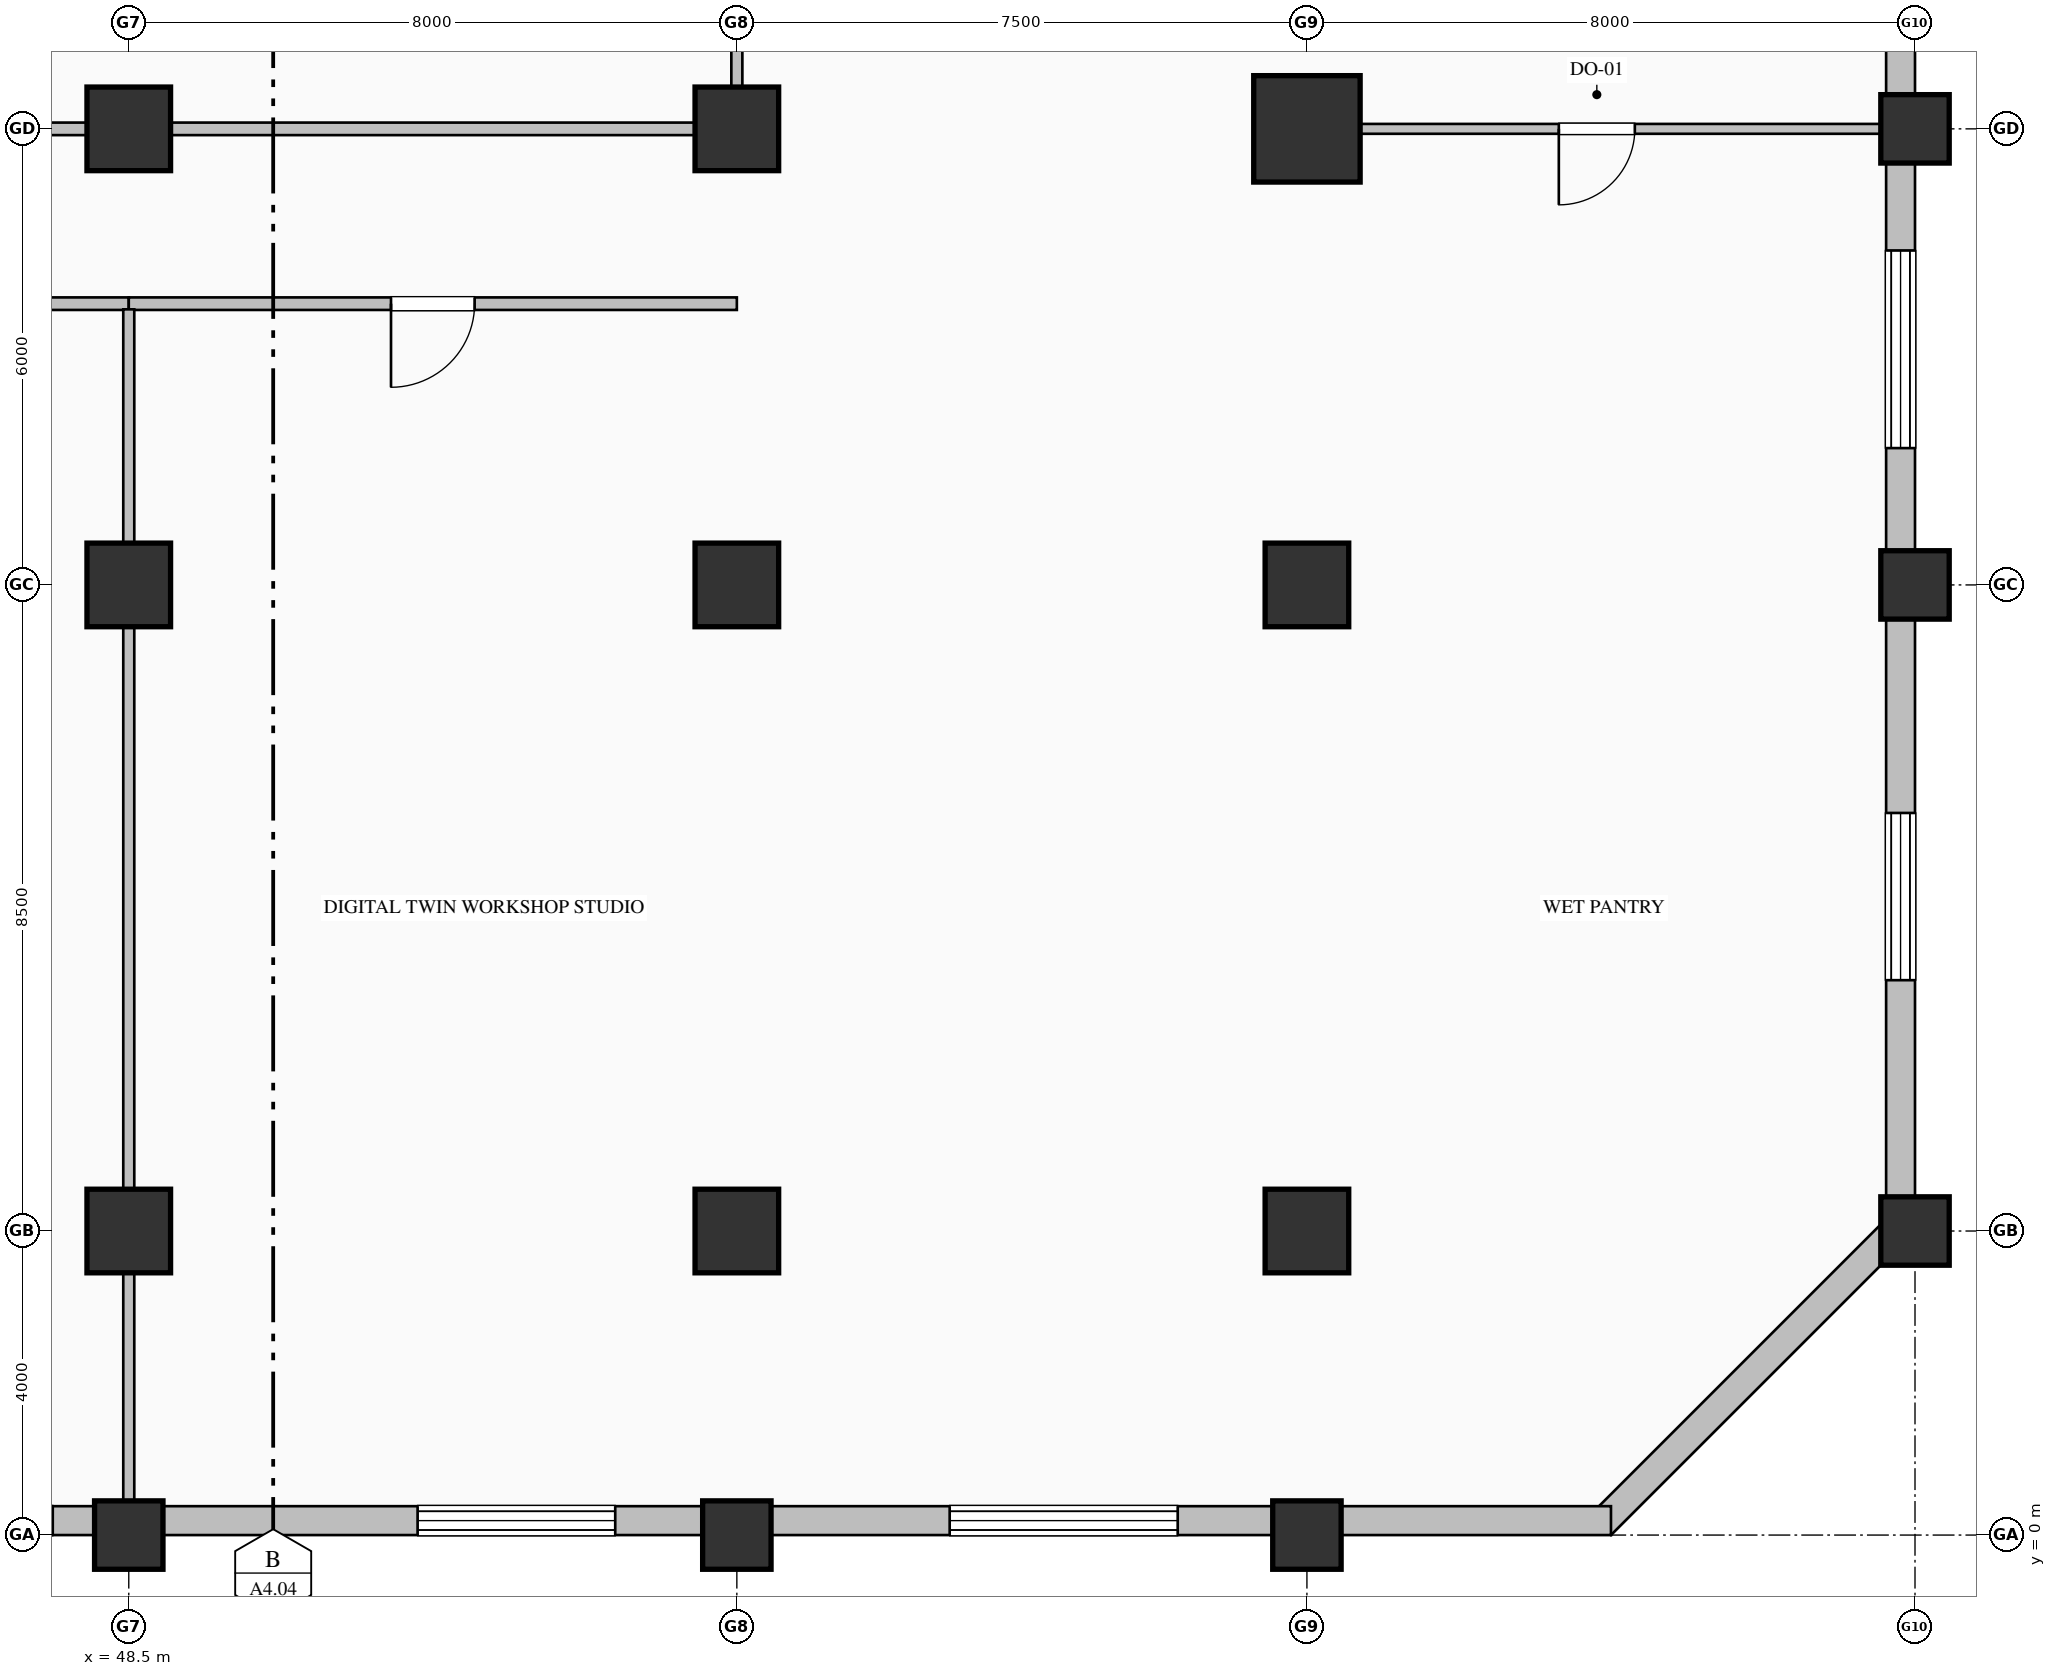
"""IFC4 building model, lengths in metres.
Left out: names, types, materials, properties, quantities, classifications, styles, units other than length and angle.
Written with IfcOpenShell. Run it as: python <this file> out.ifc"""

import sys

from ifc_helpers import new_model, si_unit, direction, frame, frame_2d, origin, origin_2d, place, context, subcontext, project, spatial, rectangle, hollow_rectangle, extrude, element, fill, save


model = new_model("IFC4")
c1 = context("Model", 3, precision=1e-05, world=origin(), true_north=direction((0.0, 1.0)))
c2 = subcontext(c1, "Body", "Model", "MODEL_VIEW")
j1 = project(units=[si_unit("LENGTHUNIT", "METRE"), si_unit("PLANEANGLEUNIT", "RADIAN")], contexts=[c1])
p1 = place(None, origin())
s1 = spatial("IfcSite", under=j1, at=p1, CompositionType="ELEMENT")
p2 = place(p1, origin())
s2 = spatial("IfcBuilding", under=s1, at=p2, CompositionType="ELEMENT")
p3 = place(p2, frame((0.0, 0.0, 17.4)))
s3 = spatial("IfcBuildingStorey", under=s2, at=p3, CompositionType="ELEMENT", Elevation=17.4)
p4 = place(p3, frame((48.5, 0.0, 0.0), z_axis=(0.0, 0.0, 1.0), x_axis=(1.0, 0.0, 0.0)))
e1 = element("IfcColumn", 1, at=p4, inside=s3, PredefinedType="PILASTER", context=c2, shape_type="SweptSolid", body=[
    extrude(rectangle(XDim=0.9, YDim=0.9, at=origin_2d()), origin(), (0.0, 0.0, 1.0), 5.4),
])
for number, where, z_axis, x_axis in (
    (2, (48.5, 4.0, 0.0), (0.0, 0.0, 1.0), (1.0, 0.0, 0.0)),
    (3, (48.5, 12.5, 0.0), (0.0, 0.0, 1.0), (1.0, 0.0, 0.0)),
    (4, (48.5, 18.5, 0.0), (0.0, 0.0, 1.0), (1.0, 0.0, 0.0)),
):
    element("IfcColumn", number, at=place(p3, frame(where, z_axis=z_axis, x_axis=x_axis)), inside=s3, PredefinedType="COLUMN", context=c2, shape_type="SweptSolid", body=[
        extrude(rectangle(XDim=1.1, YDim=1.1, at=origin_2d()), origin(), (0.0, 0.0, 1.0), 5.4),
    ])
p5 = place(p3, frame((56.5, 0.0, 0.0), z_axis=(0.0, 0.0, 1.0), x_axis=(1.0, 0.0, 0.0)))
e5 = element("IfcColumn", 5, at=p5, inside=s3, PredefinedType="PILASTER", context=c2, shape_type="SweptSolid", body=[
    extrude(rectangle(XDim=0.9, YDim=0.9, at=origin_2d()), origin(), (0.0, 0.0, 1.0), 5.4),
])
for number, where, z_axis, x_axis in (
    (6, (56.5, 4.0, 0.0), (0.0, 0.0, 1.0), (1.0, 0.0, 0.0)),
    (7, (56.5, 12.5, 0.0), (0.0, 0.0, 1.0), (1.0, 0.0, 0.0)),
    (8, (56.5, 18.5, 0.0), (0.0, 0.0, 1.0), (1.0, 0.0, 0.0)),
):
    element("IfcColumn", number, at=place(p3, frame(where, z_axis=z_axis, x_axis=x_axis)), inside=s3, PredefinedType="COLUMN", context=c2, shape_type="SweptSolid", body=[
        extrude(rectangle(XDim=1.1, YDim=1.1, at=origin_2d()), origin(), (0.0, 0.0, 1.0), 5.4),
    ])
p6 = place(p3, frame((64.0, 0.0, 0.0), z_axis=(0.0, 0.0, 1.0), x_axis=(1.0, 0.0, 0.0)))
e9 = element("IfcColumn", 9, at=p6, inside=s3, PredefinedType="PILASTER", context=c2, shape_type="SweptSolid", body=[
    extrude(rectangle(XDim=0.9, YDim=0.9, at=origin_2d()), origin(), (0.0, 0.0, 1.0), 5.4),
])
for number, where, z_axis, x_axis in (
    (10, (64.0, 4.0, 0.0), (0.0, 0.0, 1.0), (1.0, 0.0, 0.0)),
    (11, (64.0, 12.5, 0.0), (0.0, 0.0, 1.0), (1.0, 0.0, 0.0)),
):
    element("IfcColumn", number, at=place(p3, frame(where, z_axis=z_axis, x_axis=x_axis)), inside=s3, PredefinedType="COLUMN", context=c2, shape_type="SweptSolid", body=[
        extrude(rectangle(XDim=1.1, YDim=1.1, at=origin_2d()), origin(), (0.0, 0.0, 1.0), 5.4),
    ])
p7 = place(p3, frame((64.0, 18.5, 0.0), z_axis=(0.0, 0.0, 1.0), x_axis=(1.0, 0.0, 0.0)))
e12 = element("IfcColumn", 12, at=p7, inside=s3, PredefinedType="COLUMN", context=c2, shape_type="SweptSolid", body=[
    extrude(hollow_rectangle(XDim=1.4, YDim=1.4, WallThickness=0.05, at=origin_2d()), origin(), (0.0, 0.0, 1.0), 5.4),
])
for number, where, z_axis, x_axis in (
    (13, (72.0, 4.0, 0.0), (0.0, 0.0, 1.0), (1.0, 0.0, 0.0)),
    (14, (72.0, 12.5, 0.0), (0.0, 0.0, 1.0), (1.0, 0.0, 0.0)),
    (15, (72.0, 18.5, 0.0), (0.0, 0.0, 1.0), (1.0, 0.0, 0.0)),
):
    element("IfcColumn", number, at=place(p3, frame(where, z_axis=z_axis, x_axis=x_axis)), inside=s3, PredefinedType="PILASTER", context=c2, shape_type="SweptSolid", body=[
        extrude(rectangle(XDim=0.9, YDim=0.9, at=origin_2d()), origin(), (0.0, 0.0, 1.0), 5.4),
    ])
p8 = place(p3, frame((71.81, 48.0, 0.0), z_axis=(0.0, 0.0, 1.0), x_axis=(0.0, -1.0, 0.0)))
e16 = element("IfcWall", 16, at=p8, inside=s3, PredefinedType="SOLIDWALL", context=c2, shape_type="SweptSolid", body=[
    extrude(rectangle(XDim=44.0, YDim=0.38, at=frame_2d((22.0, 0.0))), origin(), (0.0, 0.0, 1.0), 4.64),
])
p9 = place(p8, frame((6.1, 0.0, 0.9)))
e17 = element("IfcOpeningElement", 17, at=p9, cuts=e16, PredefinedType="OPENING", context=c2, shape_type="SweptSolid", body=[
    extrude(rectangle(XDim=2.2, YDim=2.65, at=frame_2d((1.1, 1.325))), frame((0.0, 0.2, 0.0), z_axis=(0.0, -1.0, 0.0), x_axis=(1.0, 0.0, 0.0)), (0.0, 0.0, 1.0), 0.4),
])
p10 = place(p8, frame((12.9, 0.0, 0.85)))
e18 = element("IfcOpeningElement", 18, at=p10, cuts=e16, PredefinedType="OPENING", context=c2, shape_type="SweptSolid", body=[
    extrude(rectangle(XDim=3.0, YDim=3.2, at=frame_2d((1.5, 1.6))), frame((0.0, 0.2, 0.0), z_axis=(0.0, -1.0, 0.0), x_axis=(1.0, 0.0, 0.0)), (0.0, 0.0, 1.0), 0.4),
])
p11 = place(p8, frame((16.9, 0.0, 0.9)))
e19 = element("IfcOpeningElement", 19, at=p11, cuts=e16, PredefinedType="OPENING", context=c2, shape_type="SweptSolid", body=[
    extrude(rectangle(XDim=2.2, YDim=2.65, at=frame_2d((1.1, 1.325))), frame((0.0, 0.2, 0.0), z_axis=(0.0, -1.0, 0.0), x_axis=(1.0, 0.0, 0.0)), (0.0, 0.0, 1.0), 0.4),
])
p12 = place(p8, frame((23.7, 0.0, 0.85)))
e20 = element("IfcOpeningElement", 20, at=p12, cuts=e16, PredefinedType="OPENING", context=c2, shape_type="SweptSolid", body=[
    extrude(rectangle(XDim=3.0, YDim=3.2, at=frame_2d((1.5, 1.6))), frame((0.0, 0.2, 0.0), z_axis=(0.0, -1.0, 0.0), x_axis=(1.0, 0.0, 0.0)), (0.0, 0.0, 1.0), 0.4),
])
p13 = place(p8, frame((31.1, 0.0, 0.85)))
e21 = element("IfcOpeningElement", 21, at=p13, cuts=e16, PredefinedType="OPENING", context=c2, shape_type="SweptSolid", body=[
    extrude(rectangle(XDim=2.6, YDim=3.1, at=frame_2d((1.3, 1.55))), frame((0.0, 0.2, 0.0), z_axis=(0.0, -1.0, 0.0), x_axis=(1.0, 0.0, 0.0)), (0.0, 0.0, 1.0), 0.4),
])
p14 = place(p8, frame((38.5, 0.0, 0.9)))
e22 = element("IfcOpeningElement", 22, at=p14, cuts=e16, PredefinedType="OPENING", context=c2, shape_type="SweptSolid", body=[
    extrude(rectangle(XDim=2.2, YDim=2.65, at=frame_2d((1.1, 1.325))), frame((0.0, 0.2, 0.0), z_axis=(0.0, -1.0, 0.0), x_axis=(1.0, 0.0, 0.0)), (0.0, 0.0, 1.0), 0.4),
])
p15 = place(p3, frame((71.866, 4.134, 0.0), z_axis=(0.0, 0.0, 1.0), x_axis=(-0.707106781187, -0.707106781187, 0.0)))
e23 = element("IfcWall", 23, at=p15, inside=s3, PredefinedType="SOLIDWALL", context=c2, shape_type="SweptSolid", body=[
    extrude(rectangle(XDim=5.657, YDim=0.38, at=frame_2d((2.828, 0.0))), origin(), (0.0, 0.0, 1.0), 3.74),
])
p16 = place(p3, frame((68.0, 0.19, 0.0), z_axis=(0.0, 0.0, 1.0), x_axis=(-1.0, 0.0, 0.0)))
e24 = element("IfcWall", 24, at=p16, inside=s3, PredefinedType="SOLIDWALL", context=c2, shape_type="SweptSolid", body=[
    extrude(rectangle(XDim=64.0, YDim=0.38, at=frame_2d((32.0, 0.0))), origin(), (0.0, 0.0, 1.0), 4.64),
])
p17 = place(p16, frame((5.7, 0.0, 0.85)))
e25 = element("IfcOpeningElement", 25, at=p17, cuts=e24, PredefinedType="OPENING", context=c2, shape_type="SweptSolid", body=[
    extrude(rectangle(XDim=3.0, YDim=3.2, at=frame_2d((1.5, 1.6))), frame((0.0, 0.2, 0.0), z_axis=(0.0, -1.0, 0.0), x_axis=(1.0, 0.0, 0.0)), (0.0, 0.0, 1.0), 0.4),
])
p18 = place(p16, frame((13.1, 0.0, 0.85)))
e26 = element("IfcOpeningElement", 26, at=p18, cuts=e24, PredefinedType="OPENING", context=c2, shape_type="SweptSolid", body=[
    extrude(rectangle(XDim=2.6, YDim=3.1, at=frame_2d((1.3, 1.55))), frame((0.0, 0.2, 0.0), z_axis=(0.0, -1.0, 0.0), x_axis=(1.0, 0.0, 0.0)), (0.0, 0.0, 1.0), 0.4),
])
p19 = place(p16, frame((20.5, 0.0, 0.9)))
e27 = element("IfcOpeningElement", 27, at=p19, cuts=e24, PredefinedType="OPENING", context=c2, shape_type="SweptSolid", body=[
    extrude(rectangle(XDim=2.2, YDim=2.65, at=frame_2d((1.1, 1.325))), frame((0.0, 0.2, 0.0), z_axis=(0.0, -1.0, 0.0), x_axis=(1.0, 0.0, 0.0)), (0.0, 0.0, 1.0), 0.4),
])
p20 = place(p16, frame((23.9, 0.0, 0.85)))
e28 = element("IfcOpeningElement", 28, at=p20, cuts=e24, PredefinedType="OPENING", context=c2, shape_type="SweptSolid", body=[
    extrude(rectangle(XDim=2.6, YDim=3.1, at=frame_2d((1.3, 1.55))), frame((0.0, 0.2, 0.0), z_axis=(0.0, -1.0, 0.0), x_axis=(1.0, 0.0, 0.0)), (0.0, 0.0, 1.0), 0.4),
])
p21 = place(p16, frame((31.3, 0.0, 0.9)))
e29 = element("IfcOpeningElement", 29, at=p21, cuts=e24, PredefinedType="OPENING", context=c2, shape_type="SweptSolid", body=[
    extrude(rectangle(XDim=2.2, YDim=2.65, at=frame_2d((1.1, 1.325))), frame((0.0, 0.2, 0.0), z_axis=(0.0, -1.0, 0.0), x_axis=(1.0, 0.0, 0.0)), (0.0, 0.0, 1.0), 0.4),
])
p22 = place(p16, frame((38.1, 0.0, 0.85)))
e30 = element("IfcOpeningElement", 30, at=p22, cuts=e24, PredefinedType="OPENING", context=c2, shape_type="SweptSolid", body=[
    extrude(rectangle(XDim=3.0, YDim=3.2, at=frame_2d((1.5, 1.6))), frame((0.0, 0.2, 0.0), z_axis=(0.0, -1.0, 0.0), x_axis=(1.0, 0.0, 0.0)), (0.0, 0.0, 1.0), 0.4),
])
p23 = place(p16, frame((45.5, 0.0, 0.85)))
e31 = element("IfcOpeningElement", 31, at=p23, cuts=e24, PredefinedType="OPENING", context=c2, shape_type="SweptSolid", body=[
    extrude(rectangle(XDim=2.6, YDim=3.1, at=frame_2d((1.3, 1.55))), frame((0.0, 0.2, 0.0), z_axis=(0.0, -1.0, 0.0), x_axis=(1.0, 0.0, 0.0)), (0.0, 0.0, 1.0), 0.4),
])
p24 = place(p16, frame((52.9, 0.0, 0.9)))
e32 = element("IfcOpeningElement", 32, at=p24, cuts=e24, PredefinedType="OPENING", context=c2, shape_type="SweptSolid", body=[
    extrude(rectangle(XDim=2.2, YDim=2.65, at=frame_2d((1.1, 1.325))), frame((0.0, 0.2, 0.0), z_axis=(0.0, -1.0, 0.0), x_axis=(1.0, 0.0, 0.0)), (0.0, 0.0, 1.0), 0.4),
])
p25 = place(p3, frame((32.5, 18.5, 0.0), z_axis=(0.0, 0.0, 1.0), x_axis=(1.0, 0.0, 0.0)))
e33 = element("IfcWall", 33, at=p25, inside=s3, PredefinedType="PARTITIONING", context=c2, shape_type="SweptSolid", body=[
    extrude(rectangle(XDim=24.0, YDim=0.165, at=frame_2d((12.0, 0.0))), origin(), (0.0, 0.0, 1.0), 4.232),
])
p26 = place(p3, frame((48.5, 16.2, 0.0), z_axis=(0.0, 0.0, 1.0), x_axis=(-1.0, 0.0, 0.0)))
e34 = element("IfcWall", 34, at=p26, inside=s3, PredefinedType="PARTITIONING", context=c2, shape_type="SweptSolid", body=[
    extrude(rectangle(XDim=16.0, YDim=0.165, at=frame_2d((8.0, 0.0))), origin(), (0.0, 0.0, 1.0), 5.14),
])
p27 = place(p26, frame((7.45, 0.0, 0.0)))
e35 = element("IfcOpeningElement", 35, at=p27, cuts=e34, PredefinedType="OPENING", context=c2, shape_type="SweptSolid", body=[
    extrude(rectangle(XDim=1.1, YDim=2.2, at=frame_2d((0.55, 1.1))), frame((0.0, 0.093, 0.0), z_axis=(0.0, -1.0, 0.0), x_axis=(1.0, 0.0, 0.0)), (0.0, 0.0, 1.0), 0.185),
])
p28 = place(p3, frame((56.5, 16.2, 0.0), z_axis=(0.0, 0.0, 1.0), x_axis=(-1.0, 0.0, 0.0)))
e36 = element("IfcWall", 36, at=p28, inside=s3, PredefinedType="PARTITIONING", context=c2, shape_type="SweptSolid", body=[
    extrude(rectangle(XDim=8.0, YDim=0.165, at=frame_2d((4.0, 0.0))), origin(), (0.0, 0.0, 1.0), 5.14),
])
p29 = place(p28, frame((3.45, 0.0, 0.0)))
e37 = element("IfcOpeningElement", 37, at=p29, cuts=e36, PredefinedType="OPENING", context=c2, shape_type="SweptSolid", body=[
    extrude(rectangle(XDim=1.1, YDim=2.2, at=frame_2d((0.55, 1.1))), frame((0.0, 0.093, 0.0), z_axis=(0.0, -1.0, 0.0), x_axis=(1.0, 0.0, 0.0)), (0.0, 0.0, 1.0), 0.185),
])
p30 = place(p3, frame((56.5, 31.726, 0.0), z_axis=(0.0, 0.0, 1.0), x_axis=(0.0, -1.0, 0.0)))
e38 = element("IfcWall", 38, at=p30, inside=s3, PredefinedType="PARTITIONING", context=c2, shape_type="SweptSolid", body=[
    extrude(rectangle(XDim=13.151, YDim=0.145, at=frame_2d((6.576, 0.0))), origin(), (0.0, 0.0, 1.0), 4.232),
])
p31 = place(p3, frame((71.628, 18.5, 0.0), z_axis=(0.0, 0.0, 1.0), x_axis=(-1.0, 0.0, 0.0)))
e39 = element("IfcWall", 39, at=p31, inside=s3, PredefinedType="PARTITIONING", context=c2, shape_type="SweptSolid", body=[
    extrude(rectangle(XDim=7.628, YDim=0.13, at=frame_2d((3.814, 0.0))), origin(), (0.0, 0.0, 1.0), 4.232),
])
p32 = place(p31, frame((3.314, 0.0, 0.0)))
e40 = element("IfcOpeningElement", 40, at=p32, cuts=e39, PredefinedType="OPENING", context=c2, shape_type="SweptSolid", body=[
    extrude(rectangle(XDim=1.0, YDim=2.15, at=frame_2d((0.5, 1.075))), frame((0.0, 0.075, 0.0), z_axis=(0.0, -1.0, 0.0), x_axis=(1.0, 0.0, 0.0)), (0.0, 0.0, 1.0), 0.15),
])
p33 = place(p3, frame((48.5, 16.125, 0.0), z_axis=(0.0, 0.0, 1.0), x_axis=(0.0, -1.0, 0.0)))
e41 = element("IfcWall", 41, at=p33, inside=s3, PredefinedType="PARTITIONING", context=c2, shape_type="SweptSolid", body=[
    extrude(rectangle(XDim=15.753, YDim=0.145, at=frame_2d((7.877, 0.0))), origin(), (0.0, 0.0, 1.0), 4.232),
])
p34 = place(p13, origin())
e42 = element("IfcWindow", 42, at=p34, inside=s3, PartitioningType="TRIPLE_PANEL_VERTICAL", PredefinedType="WINDOW", context=c2, shape_type="SweptSolid", body=[
    extrude(rectangle(XDim=2.6, YDim=3.1, at=frame_2d((1.3, 1.55))), frame((0.0, 0.15, 0.0), z_axis=(0.0, -1.0, 0.0), x_axis=(1.0, 0.0, 0.0)), (0.0, 0.0, 1.0), 0.06),
])
fill(e21, e42)
p35 = place(p14, origin())
e43 = element("IfcWindow", 43, at=p35, inside=s3, PartitioningType="TRIPLE_PANEL_VERTICAL", PredefinedType="WINDOW", context=c2, shape_type="SweptSolid", body=[
    extrude(rectangle(XDim=2.2, YDim=2.65, at=frame_2d((1.1, 1.325))), frame((0.0, 0.15, 0.0), z_axis=(0.0, -1.0, 0.0), x_axis=(1.0, 0.0, 0.0)), (0.0, 0.0, 1.0), 0.06),
])
fill(e22, e43)
p36 = place(p17, origin())
e44 = element("IfcWindow", 44, at=p36, inside=s3, PartitioningType="TRIPLE_PANEL_VERTICAL", PredefinedType="WINDOW", context=c2, shape_type="SweptSolid", body=[
    extrude(rectangle(XDim=3.0, YDim=3.2, at=frame_2d((1.5, 1.6))), frame((0.0, 0.15, 0.0), z_axis=(0.0, -1.0, 0.0), x_axis=(1.0, 0.0, 0.0)), (0.0, 0.0, 1.0), 0.06),
])
fill(e25, e44)
p37 = place(p18, origin())
e45 = element("IfcWindow", 45, at=p37, inside=s3, PartitioningType="TRIPLE_PANEL_VERTICAL", PredefinedType="WINDOW", context=c2, shape_type="SweptSolid", body=[
    extrude(rectangle(XDim=2.6, YDim=3.1, at=frame_2d((1.3, 1.55))), frame((0.0, 0.15, 0.0), z_axis=(0.0, -1.0, 0.0), x_axis=(1.0, 0.0, 0.0)), (0.0, 0.0, 1.0), 0.06),
])
fill(e26, e45)
p38 = place(p29, origin())
e46 = element("IfcDoor", 46, at=p38, inside=s3, OperationType="SINGLE_SWING_RIGHT", PredefinedType="DOOR", context=c2, shape_type="SweptSolid", body=[
    extrude(rectangle(XDim=1.1, YDim=2.2, at=frame_2d((0.55, 1.1))), frame((0.0, 0.025, 0.0), z_axis=(0.0, -1.0, 0.0), x_axis=(1.0, 0.0, 0.0)), (0.0, 0.0, 1.0), 0.05),
])
fill(e37, e46)
p39 = place(p32, origin())
e47 = element("IfcDoor", 47, at=p39, inside=s3, OperationType="SINGLE_SWING_RIGHT", PredefinedType="DOOR", context=c2, shape_type="SweptSolid", body=[
    extrude(rectangle(XDim=1.0, YDim=2.15, at=frame_2d((0.5, 1.075))), frame((0.0, 0.025, 0.0), z_axis=(0.0, -1.0, 0.0), x_axis=(1.0, 0.0, 0.0)), (0.0, 0.0, 1.0), 0.05),
])
fill(e40, e47)
save(model, sys.argv[1])
